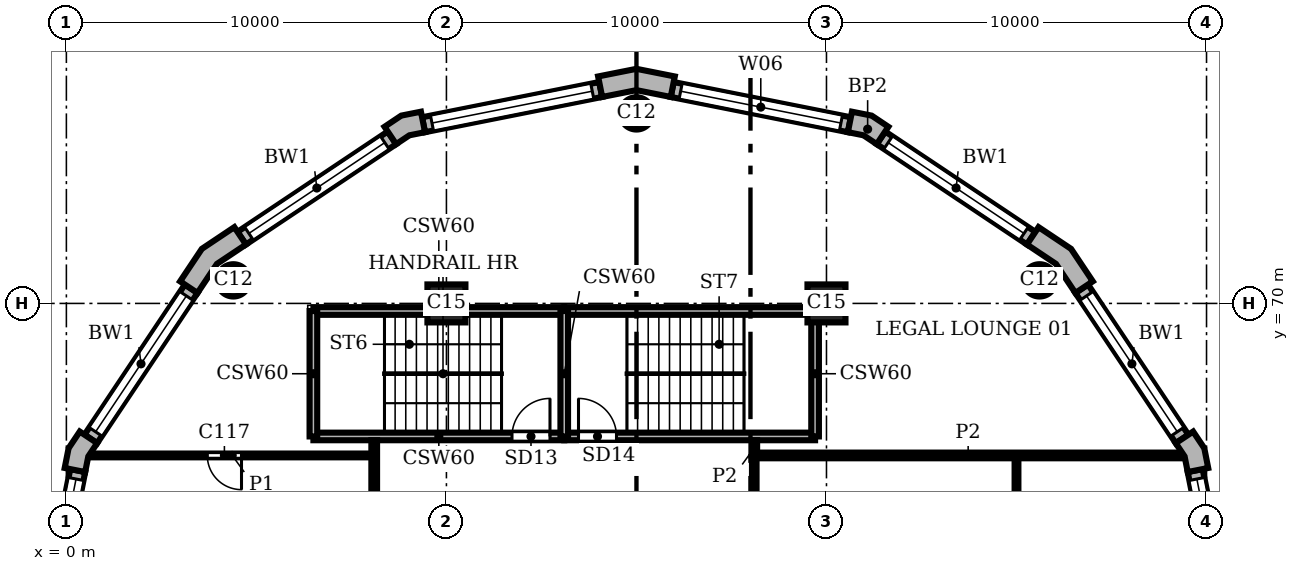
"""IFC4 building model, lengths in metres.
Left out: names, types, materials, properties, quantities, classifications, styles, units other than length and angle.
Written with IfcOpenShell. Run it as: python <this file> out.ifc"""

import sys

from ifc_helpers import new_model, si_unit, direction, frame, frame_2d, origin, origin_2d, place, context, subcontext, project, spatial, polyline, rectangle, circle, outline, extrude, element, fill, save


model = new_model("IFC4")
c1 = context("Model", 3, precision=1e-05, world=origin(), true_north=direction((0.0, 1.0)))
c2 = subcontext(c1, "Body", "Model", "MODEL_VIEW")
j1 = project(units=[si_unit("LENGTHUNIT", "METRE"), si_unit("PLANEANGLEUNIT", "RADIAN")], contexts=[c1])
p1 = place(None, origin())
s1 = spatial("IfcSite", under=j1, at=p1, CompositionType="ELEMENT")
p2 = place(p1, origin())
s2 = spatial("IfcBuilding", under=s1, at=p2, CompositionType="ELEMENT")
p3 = place(p2, frame((0.0, 0.0, 251.4)))
s3 = spatial("IfcBuildingStorey", under=s2, at=p3, CompositionType="ELEMENT", Elevation=251.4)
for number, where, z_axis, x_axis in (
    (1, (25.607, 70.607, 0.0), (0.0, 0.0, 1.0), (1.0, 0.0, 0.0)),
    (2, (15.0, 75.0, 0.0), (0.0, 0.0, 1.0), (1.0, 0.0, 0.0)),
    (3, (4.393, 70.607, 0.0), (0.0, 0.0, 1.0), (1.0, 0.0, 0.0)),
):
    element("IfcColumn", number, at=place(p3, frame(where, z_axis=z_axis, x_axis=x_axis)), inside=s3, PredefinedType="COLUMN", context=c2, shape_type="SweptSolid", body=[
        extrude(circle(Radius=0.425, at=origin_2d()), origin(), (0.0, 0.0, 1.0), 3.9),
    ])
for number, where, z_axis, x_axis in (
    (4, (10.0, 70.0, 0.0), (0.0, 0.0, 1.0), (1.0, 0.0, 0.0)),
    (5, (20.0, 70.0, 0.0), (0.0, 0.0, 1.0), (1.0, 0.0, 0.0)),
):
    element("IfcColumn", number, at=place(p3, frame(where, z_axis=z_axis, x_axis=x_axis)), inside=s3, PredefinedType="COLUMN", context=c2, shape_type="SweptSolid", body=[
        extrude(rectangle(XDim=1.0, YDim=1.0, at=origin_2d()), origin(), (0.0, 0.0, 1.0), 3.9),
    ])
p4 = place(p3, origin())
e6 = element("IfcWall", 6, at=p4, inside=s3, PredefinedType="SOLIDWALL", context=c2, shape_type="SweptSolid", body=[
    extrude(outline(polyline([(29.897, 65.641), (30.045, 65.67), (29.941, 66.189), (29.648, 66.629), (29.523, 66.545), (29.19, 66.323), (29.423, 65.974), (29.505, 65.563), (29.897, 65.641)])), origin(), (0.0, 0.0, 1.0), 3.9),
])
e7 = element("IfcWall", 7, at=p4, inside=s3, PredefinedType="SOLIDWALL", context=c2, shape_type="SweptSolid", body=[
    extrude(outline(polyline([(26.883, 70.497), (27.007, 70.58), (26.436, 71.436), (25.58, 72.007), (25.497, 71.883), (25.275, 71.55), (26.039, 71.039), (26.55, 70.275), (26.883, 70.497)])), origin(), (0.0, 0.0, 1.0), 3.9),
])
e8 = element("IfcWall", 8, at=p4, inside=s3, PredefinedType="SOLIDWALL", context=c2, shape_type="SweptSolid", body=[
    extrude(outline(polyline([(21.545, 74.523), (21.629, 74.648), (21.189, 74.941), (20.67, 75.045), (20.641, 74.897), (20.563, 74.505), (20.974, 74.423), (21.323, 74.19), (21.545, 74.523)])), origin(), (0.0, 0.0, 1.0), 3.9),
])
e9 = element("IfcWall", 9, at=p4, inside=s3, PredefinedType="SOLIDWALL", context=c2, shape_type="SweptSolid", body=[
    extrude(outline(polyline([(15.98, 75.825), (16.009, 75.972), (15.0, 76.173), (13.991, 75.972), (14.02, 75.825), (14.098, 75.432), (15.0, 75.612), (15.902, 75.432), (15.98, 75.825)])), origin(), (0.0, 0.0, 1.0), 3.9),
])
e10 = element("IfcWall", 10, at=p4, inside=s3, PredefinedType="SOLIDWALL", context=c2, shape_type="SweptSolid", body=[
    extrude(outline(polyline([(9.359, 74.897), (9.33, 75.045), (8.811, 74.941), (8.371, 74.648), (8.455, 74.523), (8.677, 74.19), (9.026, 74.423), (9.437, 74.505), (9.359, 74.897)])), origin(), (0.0, 0.0, 1.0), 3.9),
])
e11 = element("IfcWall", 11, at=p4, inside=s3, PredefinedType="SOLIDWALL", context=c2, shape_type="SweptSolid", body=[
    extrude(outline(polyline([(4.503, 71.883), (4.42, 72.007), (3.564, 71.436), (2.993, 70.58), (3.117, 70.497), (3.45, 70.275), (3.961, 71.039), (4.725, 71.55), (4.503, 71.883)])), origin(), (0.0, 0.0, 1.0), 3.9),
])
e12 = element("IfcWall", 12, at=p4, inside=s3, PredefinedType="SOLIDWALL", context=c2, shape_type="SweptSolid", body=[
    extrude(outline(polyline([(0.477, 66.545), (0.352, 66.629), (0.059, 66.189), (-0.045, 65.67), (0.103, 65.641), (0.495, 65.563), (0.577, 65.974), (0.81, 66.323), (0.477, 66.545)])), origin(), (0.0, 0.0, 1.0), 3.9),
])
p5 = place(p3, frame((30.629, 60.941, 0.0), z_axis=(0.0, 0.0, 1.0), x_axis=(-0.195098533057, 0.98078364709, 0.0)))
e13 = element("IfcWall", 13, at=p5, inside=s3, PredefinedType="SOLIDWALL", context=c2, shape_type="SweptSolid", body=[
    extrude(rectangle(XDim=4.753, YDim=0.4, at=frame_2d((2.376, 0.0))), origin(), (0.0, 0.0, 1.0), 3.9),
])
p6 = place(p5, frame((0.226, 0.0, 0.9)))
e14 = element("IfcOpeningElement", 14, at=p6, cuts=e13, PredefinedType="OPENING", context=c2, shape_type="SweptSolid", body=[
    extrude(rectangle(XDim=4.3, YDim=2.35, at=frame_2d((2.15, 1.175))), frame((0.0, 0.21, 0.0), z_axis=(0.0, -1.0, 0.0), x_axis=(1.0, 0.0, 0.0)), (0.0, 0.0, 1.0), 0.42),
])
p7 = place(p3, frame((29.357, 66.434, 0.0), z_axis=(0.0, 0.0, 1.0), x_axis=(-0.555541552266, 0.831488775454, 0.0)))
e15 = element("IfcWall", 15, at=p7, inside=s3, PredefinedType="SOLIDWALL", context=c2, shape_type="SweptSolid", body=[
    extrude(rectangle(XDim=4.753, YDim=0.4, at=frame_2d((2.376, 0.0))), origin(), (0.0, 0.0, 1.0), 3.9),
])
p8 = place(p7, frame((0.226, 0.0, 0.9)))
e16 = element("IfcOpeningElement", 16, at=p8, cuts=e15, PredefinedType="OPENING", context=c2, shape_type="SweptSolid", body=[
    extrude(rectangle(XDim=4.3, YDim=2.35, at=frame_2d((2.15, 1.175))), frame((0.0, 0.21, 0.0), z_axis=(0.0, -1.0, 0.0), x_axis=(1.0, 0.0, 0.0)), (0.0, 0.0, 1.0), 0.42),
])
p9 = place(p3, frame((25.386, 71.716, 0.0), z_axis=(0.0, 0.0, 1.0), x_axis=(-0.831488775454, 0.555541552266, 0.0)))
e17 = element("IfcWall", 17, at=p9, inside=s3, PredefinedType="SOLIDWALL", context=c2, shape_type="SweptSolid", body=[
    extrude(rectangle(XDim=4.753, YDim=0.4, at=frame_2d((2.376, 0.0))), origin(), (0.0, 0.0, 1.0), 3.9),
])
p10 = place(p9, frame((0.226, 0.0, 0.9)))
e18 = element("IfcOpeningElement", 18, at=p10, cuts=e17, PredefinedType="OPENING", context=c2, shape_type="SweptSolid", body=[
    extrude(rectangle(XDim=4.3, YDim=2.35, at=frame_2d((2.15, 1.175))), frame((0.0, 0.21, 0.0), z_axis=(0.0, -1.0, 0.0), x_axis=(1.0, 0.0, 0.0)), (0.0, 0.0, 1.0), 0.42),
])
p11 = place(p3, frame((20.602, 74.701, 0.0), z_axis=(0.0, 0.0, 1.0), x_axis=(-0.98078364709, 0.195098533057, 0.0)))
e19 = element("IfcWall", 19, at=p11, inside=s3, PredefinedType="SOLIDWALL", context=c2, shape_type="SweptSolid", body=[
    extrude(rectangle(XDim=4.753, YDim=0.4, at=frame_2d((2.376, 0.0))), origin(), (0.0, 0.0, 1.0), 3.9),
])
p12 = place(p11, frame((0.226, 0.0, 0.9)))
e20 = element("IfcOpeningElement", 20, at=p12, cuts=e19, PredefinedType="OPENING", context=c2, shape_type="SweptSolid", body=[
    extrude(rectangle(XDim=4.3, YDim=2.35, at=frame_2d((2.15, 1.175))), frame((0.0, 0.21, 0.0), z_axis=(0.0, -1.0, 0.0), x_axis=(1.0, 0.0, 0.0)), (0.0, 0.0, 1.0), 0.42),
])
p13 = place(p3, frame((14.059, 75.629, 0.0), z_axis=(0.0, 0.0, 1.0), x_axis=(-0.98078364709, -0.195098533057, 0.0)))
e21 = element("IfcWall", 21, at=p13, inside=s3, PredefinedType="SOLIDWALL", context=c2, shape_type="SweptSolid", body=[
    extrude(rectangle(XDim=4.753, YDim=0.4, at=frame_2d((2.376, 0.0))), origin(), (0.0, 0.0, 1.0), 3.9),
])
p14 = place(p13, frame((0.226, 0.0, 0.9)))
e22 = element("IfcOpeningElement", 22, at=p14, cuts=e21, PredefinedType="OPENING", context=c2, shape_type="SweptSolid", body=[
    extrude(rectangle(XDim=4.3, YDim=2.35, at=frame_2d((2.15, 1.175))), frame((0.0, 0.21, 0.0), z_axis=(0.0, -1.0, 0.0), x_axis=(1.0, 0.0, 0.0)), (0.0, 0.0, 1.0), 0.42),
])
p15 = place(p3, frame((8.566, 74.357, 0.0), z_axis=(0.0, 0.0, 1.0), x_axis=(-0.831488775454, -0.555541552266, 0.0)))
e23 = element("IfcWall", 23, at=p15, inside=s3, PredefinedType="SOLIDWALL", context=c2, shape_type="SweptSolid", body=[
    extrude(rectangle(XDim=4.753, YDim=0.4, at=frame_2d((2.376, 0.0))), origin(), (0.0, 0.0, 1.0), 3.9),
])
p16 = place(p15, frame((0.226, 0.0, 0.9)))
e24 = element("IfcOpeningElement", 24, at=p16, cuts=e23, PredefinedType="OPENING", context=c2, shape_type="SweptSolid", body=[
    extrude(rectangle(XDim=4.3, YDim=2.35, at=frame_2d((2.15, 1.175))), frame((0.0, 0.21, 0.0), z_axis=(0.0, -1.0, 0.0), x_axis=(1.0, 0.0, 0.0)), (0.0, 0.0, 1.0), 0.42),
])
p17 = place(p3, frame((3.284, 70.386, 0.0), z_axis=(0.0, 0.0, 1.0), x_axis=(-0.555541552266, -0.831488775454, 0.0)))
e25 = element("IfcWall", 25, at=p17, inside=s3, PredefinedType="SOLIDWALL", context=c2, shape_type="SweptSolid", body=[
    extrude(rectangle(XDim=4.753, YDim=0.4, at=frame_2d((2.376, 0.0))), origin(), (0.0, 0.0, 1.0), 3.9),
])
p18 = place(p17, frame((0.226, 0.0, 0.9)))
e26 = element("IfcOpeningElement", 26, at=p18, cuts=e25, PredefinedType="OPENING", context=c2, shape_type="SweptSolid", body=[
    extrude(rectangle(XDim=4.3, YDim=2.35, at=frame_2d((2.15, 1.175))), frame((0.0, 0.21, 0.0), z_axis=(0.0, -1.0, 0.0), x_axis=(1.0, 0.0, 0.0)), (0.0, 0.0, 1.0), 0.42),
])
p19 = place(p3, frame((0.299, 65.602, 0.0), z_axis=(0.0, 0.0, 1.0), x_axis=(-0.195098533057, -0.98078364709, 0.0)))
e27 = element("IfcWall", 27, at=p19, inside=s3, PredefinedType="SOLIDWALL", context=c2, shape_type="SweptSolid", body=[
    extrude(rectangle(XDim=4.753, YDim=0.4, at=frame_2d((2.376, 0.0))), origin(), (0.0, 0.0, 1.0), 3.9),
])
p20 = place(p19, frame((0.226, 0.0, 0.9)))
e28 = element("IfcOpeningElement", 28, at=p20, cuts=e27, PredefinedType="OPENING", context=c2, shape_type="SweptSolid", body=[
    extrude(rectangle(XDim=4.3, YDim=2.35, at=frame_2d((2.15, 1.175))), frame((0.0, 0.21, 0.0), z_axis=(0.0, -1.0, 0.0), x_axis=(1.0, 0.0, 0.0)), (0.0, 0.0, 1.0), 0.42),
])
p21 = place(p3, frame((6.5, 66.5, 0.0), z_axis=(0.0, 0.0, 1.0), x_axis=(1.0, 0.0, 0.0)))
e29 = element("IfcWall", 29, at=p21, inside=s3, PredefinedType="SHEAR", context=c2, shape_type="SweptSolid", body=[
    extrude(rectangle(XDim=6.6, YDim=0.2, at=frame_2d((3.3, 0.0))), origin(), (0.0, 0.0, 1.0), 3.58),
])
p22 = place(p21, frame((5.225, 0.0, 0.0)))
e30 = element("IfcOpeningElement", 30, at=p22, cuts=e29, PredefinedType="OPENING", context=c2, shape_type="SweptSolid", body=[
    extrude(rectangle(XDim=1.0, YDim=2.1, at=frame_2d((0.5, 1.05))), frame((0.0, 0.11, 0.0), z_axis=(0.0, -1.0, 0.0), x_axis=(1.0, 0.0, 0.0)), (0.0, 0.0, 1.0), 0.22),
])
p23 = place(p3, frame((13.1, 66.5, 0.0), z_axis=(0.0, 0.0, 1.0), x_axis=(1.0, 0.0, 0.0)))
e31 = element("IfcWall", 31, at=p23, inside=s3, PredefinedType="SHEAR", context=c2, shape_type="SweptSolid", body=[
    extrude(rectangle(XDim=6.6, YDim=0.2, at=frame_2d((3.3, 0.0))), origin(), (0.0, 0.0, 1.0), 3.58),
])
p24 = place(p23, frame((0.375, 0.0, 0.0)))
e32 = element("IfcOpeningElement", 32, at=p24, cuts=e31, PredefinedType="OPENING", context=c2, shape_type="SweptSolid", body=[
    extrude(rectangle(XDim=1.0, YDim=2.1, at=frame_2d((0.5, 1.05))), frame((0.0, 0.11, 0.0), z_axis=(0.0, -1.0, 0.0), x_axis=(1.0, 0.0, 0.0)), (0.0, 0.0, 1.0), 0.22),
])
p25 = place(p3, frame((6.5, 69.8, 0.0), z_axis=(0.0, 0.0, 1.0), x_axis=(1.0, 0.0, 0.0)))
e33 = element("IfcWall", 33, at=p25, inside=s3, PredefinedType="SHEAR", context=c2, shape_type="SweptSolid", body=[
    extrude(rectangle(XDim=6.6, YDim=0.2, at=frame_2d((3.3, 0.0))), origin(), (0.0, 0.0, 1.0), 3.58),
])
p26 = place(p3, frame((13.1, 69.8, 0.0), z_axis=(0.0, 0.0, 1.0), x_axis=(1.0, 0.0, 0.0)))
e34 = element("IfcWall", 34, at=p26, inside=s3, PredefinedType="SHEAR", context=c2, shape_type="SweptSolid", body=[
    extrude(rectangle(XDim=6.6, YDim=0.2, at=frame_2d((3.3, 0.0))), origin(), (0.0, 0.0, 1.0), 3.58),
])
for number, where, z_axis, x_axis in (
    (35, (6.5, 66.5, 0.0), (0.0, 0.0, 1.0), (0.0, 1.0, 0.0)),
    (36, (13.1, 66.5, 0.0), (0.0, 0.0, 1.0), (0.0, 1.0, 0.0)),
    (37, (19.7, 66.5, 0.0), (0.0, 0.0, 1.0), (0.0, 1.0, 0.0)),
):
    element("IfcWall", number, at=place(p3, frame(where, z_axis=z_axis, x_axis=x_axis)), inside=s3, PredefinedType="SHEAR", context=c2, shape_type="SweptSolid", body=[
        extrude(rectangle(XDim=3.3, YDim=0.2, at=frame_2d((1.65, 0.0))), origin(), (0.0, 0.0, 1.0), 3.58),
    ])
p27 = place(p3, frame((25.0, 60.0, 0.0), z_axis=(0.0, 0.0, 1.0), x_axis=(0.0, 1.0, 0.0)))
e38 = element("IfcWall", 38, at=p27, inside=s3, PredefinedType="PARTITIONING", context=c2, shape_type="SweptSolid", body=[
    extrude(rectangle(XDim=6.0, YDim=0.1, at=frame_2d((3.0, 0.0))), origin(), (0.0, 0.0, 1.0), 3.58),
])
p28 = place(p27, frame((1.85, 0.0, 0.0)))
e39 = element("IfcOpeningElement", 39, at=p28, cuts=e38, PredefinedType="OPENING", context=c2, shape_type="SweptSolid", body=[
    extrude(rectangle(XDim=0.9, YDim=2.1, at=frame_2d((0.45, 1.05))), frame((0.0, 0.06, 0.0), z_axis=(0.0, -1.0, 0.0), x_axis=(1.0, 0.0, 0.0)), (0.0, 0.0, 1.0), 0.12),
])
p29 = place(p3, frame((0.627, 66.0, 0.0), z_axis=(0.0, 0.0, 1.0), x_axis=(1.0, 0.0, 0.0)))
e40 = element("IfcWall", 40, at=p29, inside=s3, PredefinedType="PARTITIONING", context=c2, shape_type="SweptSolid", body=[
    extrude(rectangle(XDim=7.473, YDim=0.1, at=frame_2d((3.736, 0.0))), origin(), (0.0, 0.0, 1.0), 3.58),
])
p30 = place(p29, frame((3.081, 0.0, 0.0)))
e41 = element("IfcOpeningElement", 41, at=p30, cuts=e40, PredefinedType="OPENING", context=c2, shape_type="SweptSolid", body=[
    extrude(rectangle(XDim=0.9, YDim=2.1, at=frame_2d((0.45, 1.05))), frame((0.0, 0.06, 0.0), z_axis=(0.0, -1.0, 0.0), x_axis=(1.0, 0.0, 0.0)), (0.0, 0.0, 1.0), 0.12),
])
p31 = place(p3, frame((8.1, 60.0, 0.0), z_axis=(0.0, 0.0, 1.0), x_axis=(0.0, 1.0, 0.0)))
e42 = element("IfcWall", 42, at=p31, inside=s3, PredefinedType="PARTITIONING", context=c2, shape_type="SweptSolid", body=[
    extrude(rectangle(XDim=6.4, YDim=0.15, at=frame_2d((3.2, 0.0))), origin(), (0.0, 0.0, 1.0), 3.58),
])
p32 = place(p31, frame((2.6, 0.0, 0.0)))
e43 = element("IfcOpeningElement", 43, at=p32, cuts=e42, PredefinedType="OPENING", context=c2, shape_type="SweptSolid", body=[
    extrude(rectangle(XDim=1.0, YDim=2.1, at=frame_2d((0.5, 1.05))), frame((0.0, 0.085, 0.0), z_axis=(0.0, -1.0, 0.0), x_axis=(1.0, 0.0, 0.0)), (0.0, 0.0, 1.0), 0.17),
])
p33 = place(p3, frame((18.1, 66.0, 0.0), z_axis=(0.0, 0.0, 1.0), x_axis=(0.0, 1.0, 0.0)))
e44 = element("IfcWall", 44, at=p33, inside=s3, PredefinedType="PARTITIONING", context=c2, shape_type="SweptSolid", body=[
    extrude(rectangle(XDim=0.4, YDim=0.15, at=frame_2d((0.2, 0.0))), origin(), (0.0, 0.0, 1.0), 3.58),
])
p34 = place(p3, frame((18.1, 66.0, 0.0), z_axis=(0.0, 0.0, 1.0), x_axis=(1.0, 0.0, 0.0)))
e45 = element("IfcWall", 45, at=p34, inside=s3, PredefinedType="PARTITIONING", context=c2, shape_type="SweptSolid", body=[
    extrude(rectangle(XDim=11.256, YDim=0.15, at=frame_2d((5.628, 0.0))), origin(), (0.0, 0.0, 1.0), 3.58),
])
p35 = place(p3, frame((18.1, 60.0, 0.0), z_axis=(0.0, 0.0, 1.0), x_axis=(0.0, 1.0, 0.0)))
e46 = element("IfcWall", 46, at=p35, inside=s3, PredefinedType="PARTITIONING", context=c2, shape_type="SweptSolid", body=[
    extrude(rectangle(XDim=6.0, YDim=0.12, at=frame_2d((3.0, 0.0))), origin(), (0.0, 0.0, 1.0), 3.58),
])
p36 = place(p35, frame((2.6, 0.0, 0.0)))
e47 = element("IfcOpeningElement", 47, at=p36, cuts=e46, PredefinedType="OPENING", context=c2, shape_type="SweptSolid", body=[
    extrude(rectangle(XDim=1.8, YDim=2.1, at=frame_2d((0.9, 1.05))), frame((0.0, 0.07, 0.0), z_axis=(0.0, -1.0, 0.0), x_axis=(1.0, 0.0, 0.0)), (0.0, 0.0, 1.0), 0.14),
])
p37 = place(p6, origin())
e48 = element("IfcWindow", 48, at=p37, inside=s3, PartitioningType="SINGLE_PANEL", PredefinedType="WINDOW", context=c2, shape_type="SweptSolid", body=[
    extrude(rectangle(XDim=4.3, YDim=2.35, at=frame_2d((2.15, 1.175))), frame((0.0, 0.16, 0.0), z_axis=(0.0, -1.0, 0.0), x_axis=(1.0, 0.0, 0.0)), (0.0, 0.0, 1.0), 0.06),
])
fill(e14, e48)
p38 = place(p8, origin())
e49 = element("IfcWindow", 49, at=p38, inside=s3, PartitioningType="SINGLE_PANEL", PredefinedType="WINDOW", context=c2, shape_type="SweptSolid", body=[
    extrude(rectangle(XDim=4.3, YDim=2.35, at=frame_2d((2.15, 1.175))), frame((0.0, 0.16, 0.0), z_axis=(0.0, -1.0, 0.0), x_axis=(1.0, 0.0, 0.0)), (0.0, 0.0, 1.0), 0.06),
])
fill(e16, e49)
p39 = place(p10, origin())
e50 = element("IfcWindow", 50, at=p39, inside=s3, PartitioningType="SINGLE_PANEL", PredefinedType="WINDOW", context=c2, shape_type="SweptSolid", body=[
    extrude(rectangle(XDim=4.3, YDim=2.35, at=frame_2d((2.15, 1.175))), frame((0.0, 0.16, 0.0), z_axis=(0.0, -1.0, 0.0), x_axis=(1.0, 0.0, 0.0)), (0.0, 0.0, 1.0), 0.06),
])
fill(e18, e50)
p40 = place(p12, origin())
e51 = element("IfcWindow", 51, at=p40, inside=s3, PartitioningType="SINGLE_PANEL", PredefinedType="WINDOW", context=c2, shape_type="SweptSolid", body=[
    extrude(rectangle(XDim=4.3, YDim=2.35, at=frame_2d((2.15, 1.175))), frame((0.0, 0.16, 0.0), z_axis=(0.0, -1.0, 0.0), x_axis=(1.0, 0.0, 0.0)), (0.0, 0.0, 1.0), 0.06),
])
fill(e20, e51)
p41 = place(p14, origin())
e52 = element("IfcWindow", 52, at=p41, inside=s3, PartitioningType="SINGLE_PANEL", PredefinedType="WINDOW", context=c2, shape_type="SweptSolid", body=[
    extrude(rectangle(XDim=4.3, YDim=2.35, at=frame_2d((2.15, 1.175))), frame((0.0, 0.16, 0.0), z_axis=(0.0, -1.0, 0.0), x_axis=(1.0, 0.0, 0.0)), (0.0, 0.0, 1.0), 0.06),
])
fill(e22, e52)
p42 = place(p16, origin())
e53 = element("IfcWindow", 53, at=p42, inside=s3, PartitioningType="SINGLE_PANEL", PredefinedType="WINDOW", context=c2, shape_type="SweptSolid", body=[
    extrude(rectangle(XDim=4.3, YDim=2.35, at=frame_2d((2.15, 1.175))), frame((0.0, 0.16, 0.0), z_axis=(0.0, -1.0, 0.0), x_axis=(1.0, 0.0, 0.0)), (0.0, 0.0, 1.0), 0.06),
])
fill(e24, e53)
p43 = place(p18, origin())
e54 = element("IfcWindow", 54, at=p43, inside=s3, PartitioningType="SINGLE_PANEL", PredefinedType="WINDOW", context=c2, shape_type="SweptSolid", body=[
    extrude(rectangle(XDim=4.3, YDim=2.35, at=frame_2d((2.15, 1.175))), frame((0.0, 0.16, 0.0), z_axis=(0.0, -1.0, 0.0), x_axis=(1.0, 0.0, 0.0)), (0.0, 0.0, 1.0), 0.06),
])
fill(e26, e54)
p44 = place(p20, origin())
e55 = element("IfcWindow", 55, at=p44, inside=s3, PartitioningType="SINGLE_PANEL", PredefinedType="WINDOW", context=c2, shape_type="SweptSolid", body=[
    extrude(rectangle(XDim=4.3, YDim=2.35, at=frame_2d((2.15, 1.175))), frame((0.0, 0.16, 0.0), z_axis=(0.0, -1.0, 0.0), x_axis=(1.0, 0.0, 0.0)), (0.0, 0.0, 1.0), 0.06),
])
fill(e28, e55)
p45 = place(p22, origin())
e56 = element("IfcDoor", 56, at=p45, inside=s3, OperationType="SINGLE_SWING_RIGHT", PredefinedType="DOOR", context=c2, shape_type="SweptSolid", body=[
    extrude(rectangle(XDim=1.0, YDim=2.1, at=frame_2d((0.5, 1.05))), frame((0.0, 0.025, 0.0), z_axis=(0.0, -1.0, 0.0), x_axis=(1.0, 0.0, 0.0)), (0.0, 0.0, 1.0), 0.05),
])
fill(e30, e56)
p46 = place(p24, origin())
e57 = element("IfcDoor", 57, at=p46, inside=s3, OperationType="SINGLE_SWING_LEFT", PredefinedType="DOOR", context=c2, shape_type="SweptSolid", body=[
    extrude(rectangle(XDim=1.0, YDim=2.1, at=frame_2d((0.5, 1.05))), frame((0.0, 0.025, 0.0), z_axis=(0.0, -1.0, 0.0), x_axis=(1.0, 0.0, 0.0)), (0.0, 0.0, 1.0), 0.05),
])
fill(e32, e57)
p47 = place(p30, frame((0.9, 0.0, 0.0), z_axis=(0.0, 0.0, 1.0), x_axis=(-1.0, 0.0, 0.0)))
e58 = element("IfcDoor", 58, at=p47, inside=s3, OperationType="SINGLE_SWING_LEFT", PredefinedType="DOOR", context=c2, shape_type="SweptSolid", body=[
    extrude(rectangle(XDim=0.9, YDim=2.1, at=frame_2d((0.45, 1.05))), frame((0.0, 0.025, 0.0), z_axis=(0.0, -1.0, 0.0), x_axis=(1.0, 0.0, 0.0)), (0.0, 0.0, 1.0), 0.05),
])
fill(e41, e58)
save(model, sys.argv[1])
